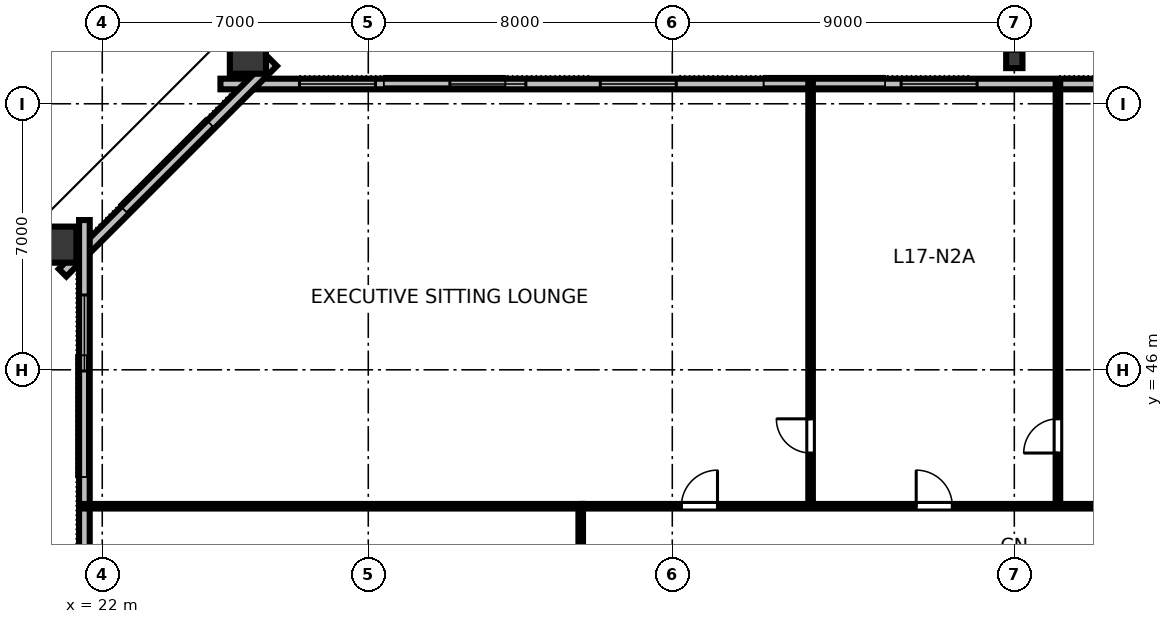
"""IFC4 building model, lengths in metres.
Left out: names, types, materials, properties, quantities, classifications, styles, units other than length and angle.
Written with IfcOpenShell. Run it as: python <this file> out.ifc"""

import sys

from ifc_helpers import new_model, si_unit, direction, frame, frame_2d, origin, origin_2d, place, context, subcontext, project, spatial, rectangle, hollow_rectangle, i_section, extrude, element, fill, save


model = new_model("IFC4")
c1 = context("Model", 3, precision=1e-05, world=origin(), true_north=direction((0.0, 1.0)))
c2 = subcontext(c1, "Body", "Model", "MODEL_VIEW")
j1 = project(units=[si_unit("LENGTHUNIT", "METRE"), si_unit("PLANEANGLEUNIT", "RADIAN")], contexts=[c1])
p1 = place(None, origin())
s1 = spatial("IfcSite", under=j1, at=p1, CompositionType="ELEMENT")
p2 = place(p1, origin())
s2 = spatial("IfcBuilding", under=s1, at=p2, CompositionType="ELEMENT")
p3 = place(p2, frame((0.0, 0.0, 67.6)))
s3 = spatial("IfcBuildingStorey", under=s2, at=p3, CompositionType="ELEMENT", Elevation=67.6)
p4 = place(p3, frame((46.0, 54.18, 0.0), z_axis=(0.0, 0.089001216718, 0.996031517284), x_axis=(-1.0, 0.0, 0.0)))
e1 = element("IfcColumn", 1, at=p4, inside=s3, PredefinedType="COLUMN", context=c2, shape_type="SweptSolid", body=[
    extrude(i_section(OverallWidth=0.428, OverallDepth=0.483, WebThickness=0.051, FlangeThickness=0.082, FilletRadius=0.025, at=origin_2d()), origin(), (0.0, 0.0, 1.0), 3.371),
])
p5 = place(p3, frame((25.832, 54.365, 0.0), z_axis=(-0.044927645815, 0.088480693771, 0.995064155455), x_axis=(-0.891639602851, -0.452745865389, 0.0)))
e2 = element("IfcColumn", 2, at=p5, inside=s3, PredefinedType="COLUMN", context=c2, shape_type="SweptSolid", body=[
    extrude(hollow_rectangle(XDim=0.95, YDim=1.15, WallThickness=0.06, at=origin_2d()), origin(), (0.0, 0.0, 1.0), 3.375),
])
p6 = place(p3, frame((20.744, 49.293, 0.0), z_axis=(-0.103221863164, 0.030287087301, 0.994197133021), x_axis=(0.953979075254, -0.279914028383, 0.107573512968)))
e3 = element("IfcColumn", 3, at=p6, inside=s3, PredefinedType="COLUMN", context=c2, shape_type="SweptSolid", body=[
    extrude(hollow_rectangle(XDim=0.95, YDim=1.15, WallThickness=0.06, at=origin_2d()), origin(), (0.0, 0.0, 1.0), 3.377),
])
p7 = place(p3, frame((66.89, 53.52, 0.0), z_axis=(0.0, 0.0, 1.0), x_axis=(-1.0, 0.0, 0.0)))
e4 = element("IfcWall", 4, at=p7, inside=s3, PredefinedType="STANDARD", context=c2, shape_type="SweptSolid", body=[
    extrude(rectangle(XDim=41.78, YDim=0.28, at=frame_2d((20.89, 0.0))), origin(), (0.0, 0.0, 1.0), 3.36),
])
p8 = place(p7, frame((2.079, 0.0, 0.8)))
e5 = element("IfcOpeningElement", 5, at=p8, cuts=e4, PredefinedType="OPENING", context=c2, shape_type="SweptSolid", body=[
    extrude(rectangle(XDim=2.0, YDim=1.95, at=frame_2d((1.0, 0.975))), frame((0.0, 0.15, 0.0), z_axis=(0.0, -1.0, 0.0), x_axis=(1.0, 0.0, 0.0)), (0.0, 0.0, 1.0), 0.3),
])
p9 = place(p7, frame((6.037, 0.0, 0.8)))
e6 = element("IfcOpeningElement", 6, at=p9, cuts=e4, PredefinedType="OPENING", context=c2, shape_type="SweptSolid", body=[
    extrude(rectangle(XDim=2.0, YDim=1.95, at=frame_2d((1.0, 0.975))), frame((0.0, 0.15, 0.0), z_axis=(0.0, -1.0, 0.0), x_axis=(1.0, 0.0, 0.0)), (0.0, 0.0, 1.0), 0.3),
])
p10 = place(p7, frame((9.995, 0.0, 0.8)))
e7 = element("IfcOpeningElement", 7, at=p10, cuts=e4, PredefinedType="OPENING", context=c2, shape_type="SweptSolid", body=[
    extrude(rectangle(XDim=2.0, YDim=1.95, at=frame_2d((1.0, 0.975))), frame((0.0, 0.15, 0.0), z_axis=(0.0, -1.0, 0.0), x_axis=(1.0, 0.0, 0.0)), (0.0, 0.0, 1.0), 0.3),
])
p11 = place(p7, frame((21.869, 0.0, 0.8)))
e8 = element("IfcOpeningElement", 8, at=p11, cuts=e4, PredefinedType="OPENING", context=c2, shape_type="SweptSolid", body=[
    extrude(rectangle(XDim=2.0, YDim=1.95, at=frame_2d((1.0, 0.975))), frame((0.0, 0.15, 0.0), z_axis=(0.0, -1.0, 0.0), x_axis=(1.0, 0.0, 0.0)), (0.0, 0.0, 1.0), 0.3),
])
p12 = place(p7, frame((29.785, 0.0, 0.8)))
e9 = element("IfcOpeningElement", 9, at=p12, cuts=e4, PredefinedType="OPENING", context=c2, shape_type="SweptSolid", body=[
    extrude(rectangle(XDim=2.0, YDim=1.95, at=frame_2d((1.0, 0.975))), frame((0.0, 0.15, 0.0), z_axis=(0.0, -1.0, 0.0), x_axis=(1.0, 0.0, 0.0)), (0.0, 0.0, 1.0), 0.3),
])
p13 = place(p7, frame((33.743, 0.0, 0.8)))
e10 = element("IfcOpeningElement", 10, at=p13, cuts=e4, PredefinedType="OPENING", context=c2, shape_type="SweptSolid", body=[
    extrude(rectangle(XDim=2.0, YDim=1.95, at=frame_2d((1.0, 0.975))), frame((0.0, 0.15, 0.0), z_axis=(0.0, -1.0, 0.0), x_axis=(1.0, 0.0, 0.0)), (0.0, 0.0, 1.0), 0.3),
])
p14 = place(p7, frame((37.701, 0.0, 0.8)))
e11 = element("IfcOpeningElement", 11, at=p14, cuts=e4, PredefinedType="OPENING", context=c2, shape_type="SweptSolid", body=[
    extrude(rectangle(XDim=2.0, YDim=1.95, at=frame_2d((1.0, 0.975))), frame((0.0, 0.15, 0.0), z_axis=(0.0, -1.0, 0.0), x_axis=(1.0, 0.0, 0.0)), (0.0, 0.0, 1.0), 0.3),
])
p15 = place(p3, frame((26.496, 54.094, 0.0), z_axis=(0.0, 0.0, 1.0), x_axis=(-0.707106781187, -0.707106781187, 0.0)))
e12 = element("IfcWall", 12, at=p15, inside=s3, PredefinedType="STANDARD", context=c2, shape_type="SweptSolid", body=[
    extrude(rectangle(XDim=7.834, YDim=0.28, at=frame_2d((3.917, 0.0))), origin(), (0.0, 0.0, 1.0), 3.36),
])
p16 = place(p3, frame((21.53, 49.94, 0.0), z_axis=(0.0, 0.0, 1.0), x_axis=(0.0, -1.0, 0.0)))
e13 = element("IfcWall", 13, at=p16, inside=s3, PredefinedType="STANDARD", context=c2, shape_type="SweptSolid", body=[
    extrude(rectangle(XDim=35.88, YDim=0.28, at=frame_2d((17.94, 0.0))), origin(), (0.0, 0.0, 1.0), 3.36),
])
p17 = place(p16, frame((14.57, 0.0, 0.0)))
e14 = element("IfcOpeningElement", 14, at=p17, cuts=e13, PredefinedType="OPENING", context=c2, shape_type="SweptSolid", body=[
    extrude(rectangle(XDim=1.4, YDim=2.15, at=frame_2d((0.7, 1.075))), frame((0.0, 0.15, 0.0), z_axis=(0.0, -1.0, 0.0), x_axis=(1.0, 0.0, 0.0)), (0.0, 0.0, 1.0), 0.3),
])
p18 = place(p16, frame((1.971, 0.0, 0.8)))
e15 = element("IfcOpeningElement", 15, at=p18, cuts=e13, PredefinedType="OPENING", context=c2, shape_type="SweptSolid", body=[
    extrude(rectangle(XDim=2.0, YDim=1.95, at=frame_2d((1.0, 0.975))), frame((0.0, 0.15, 0.0), z_axis=(0.0, -1.0, 0.0), x_axis=(1.0, 0.0, 0.0)), (0.0, 0.0, 1.0), 0.3),
])
p19 = place(p16, frame((9.456, 0.0, 0.8)))
e16 = element("IfcOpeningElement", 16, at=p19, cuts=e13, PredefinedType="OPENING", context=c2, shape_type="SweptSolid", body=[
    extrude(rectangle(XDim=2.0, YDim=1.95, at=frame_2d((1.0, 0.975))), frame((0.0, 0.15, 0.0), z_axis=(0.0, -1.0, 0.0), x_axis=(1.0, 0.0, 0.0)), (0.0, 0.0, 1.0), 0.3),
])
p20 = place(p16, frame((20.682, 0.0, 0.8)))
e17 = element("IfcOpeningElement", 17, at=p20, cuts=e13, PredefinedType="OPENING", context=c2, shape_type="SweptSolid", body=[
    extrude(rectangle(XDim=2.0, YDim=1.95, at=frame_2d((1.0, 0.975))), frame((0.0, 0.15, 0.0), z_axis=(0.0, -1.0, 0.0), x_axis=(1.0, 0.0, 0.0)), (0.0, 0.0, 1.0), 0.3),
])
p21 = place(p16, frame((24.424, 0.0, 0.8)))
e18 = element("IfcOpeningElement", 18, at=p21, cuts=e13, PredefinedType="OPENING", context=c2, shape_type="SweptSolid", body=[
    extrude(rectangle(XDim=2.0, YDim=1.95, at=frame_2d((1.0, 0.975))), frame((0.0, 0.15, 0.0), z_axis=(0.0, -1.0, 0.0), x_axis=(1.0, 0.0, 0.0)), (0.0, 0.0, 1.0), 0.3),
])
p22 = place(p16, frame((31.909, 0.0, 0.8)))
e19 = element("IfcOpeningElement", 19, at=p22, cuts=e13, PredefinedType="OPENING", context=c2, shape_type="SweptSolid", body=[
    extrude(rectangle(XDim=2.0, YDim=1.95, at=frame_2d((1.0, 0.975))), frame((0.0, 0.15, 0.0), z_axis=(0.0, -1.0, 0.0), x_axis=(1.0, 0.0, 0.0)), (0.0, 0.0, 1.0), 0.3),
])
p23 = place(p3, frame((40.639, 42.41, 0.0), z_axis=(0.0, 0.0, 1.0), x_axis=(0.0, 1.0, 0.0)))
e20 = element("IfcWall", 20, at=p23, inside=s3, PredefinedType="PARTITIONING", context=c2, shape_type="SweptSolid", body=[
    extrude(rectangle(XDim=11.11, YDim=0.12, at=frame_2d((5.555, 0.0))), origin(), (0.0, 0.0, 1.0), 2.64),
])
p24 = place(p23, frame((1.4, 0.0, 0.0)))
e21 = element("IfcOpeningElement", 21, at=p24, cuts=e20, PredefinedType="OPENING", context=c2, shape_type="SweptSolid", body=[
    extrude(rectangle(XDim=0.9, YDim=2.15, at=frame_2d((0.45, 1.075))), frame((0.0, 0.07, 0.0), z_axis=(0.0, -1.0, 0.0), x_axis=(1.0, 0.0, 0.0)), (0.0, 0.0, 1.0), 0.14),
])
p25 = place(p3, frame((47.148, 42.41, 0.0), z_axis=(0.0, 0.0, 1.0), x_axis=(0.0, 1.0, 0.0)))
e22 = element("IfcWall", 22, at=p25, inside=s3, PredefinedType="PARTITIONING", context=c2, shape_type="SweptSolid", body=[
    extrude(rectangle(XDim=11.11, YDim=0.12, at=frame_2d((5.555, 0.0))), origin(), (0.0, 0.0, 1.0), 2.64),
])
p26 = place(p25, frame((1.4, 0.0, 0.0)))
e23 = element("IfcOpeningElement", 23, at=p26, cuts=e22, PredefinedType="OPENING", context=c2, shape_type="SweptSolid", body=[
    extrude(rectangle(XDim=0.9, YDim=2.15, at=frame_2d((0.45, 1.075))), frame((0.0, 0.07, 0.0), z_axis=(0.0, -1.0, 0.0), x_axis=(1.0, 0.0, 0.0)), (0.0, 0.0, 1.0), 0.14),
])
p27 = place(p3, frame((34.65, 42.41, 0.0), z_axis=(0.0, 0.0, 1.0), x_axis=(1.0, 0.0, 0.0)))
e24 = element("IfcWall", 24, at=p27, inside=s3, PredefinedType="PARTITIONING", context=c2, shape_type="SweptSolid", body=[
    extrude(rectangle(XDim=22.7, YDim=0.12, at=frame_2d((11.35, 0.0))), origin(), (0.0, 0.0, 1.0), 2.64),
])
p28 = place(p27, frame((2.59, 0.0, 0.0)))
e25 = element("IfcOpeningElement", 25, at=p28, cuts=e24, PredefinedType="OPENING", context=c2, shape_type="SweptSolid", body=[
    extrude(rectangle(XDim=0.95, YDim=2.15, at=frame_2d((0.475, 1.075))), frame((0.0, 0.07, 0.0), z_axis=(0.0, -1.0, 0.0), x_axis=(1.0, 0.0, 0.0)), (0.0, 0.0, 1.0), 0.14),
])
p29 = place(p27, frame((8.768, 0.0, 0.0)))
e26 = element("IfcOpeningElement", 26, at=p29, cuts=e24, PredefinedType="OPENING", context=c2, shape_type="SweptSolid", body=[
    extrude(rectangle(XDim=0.95, YDim=2.15, at=frame_2d((0.475, 1.075))), frame((0.0, 0.07, 0.0), z_axis=(0.0, -1.0, 0.0), x_axis=(1.0, 0.0, 0.0)), (0.0, 0.0, 1.0), 0.14),
])
p30 = place(p27, frame((14.079, 0.0, 0.0)))
e27 = element("IfcOpeningElement", 27, at=p30, cuts=e24, PredefinedType="OPENING", context=c2, shape_type="SweptSolid", body=[
    extrude(rectangle(XDim=0.95, YDim=2.15, at=frame_2d((0.475, 1.075))), frame((0.0, 0.07, 0.0), z_axis=(0.0, -1.0, 0.0), x_axis=(1.0, 0.0, 0.0)), (0.0, 0.0, 1.0), 0.14),
])
p31 = place(p27, frame((19.11, 0.0, 0.0)))
e28 = element("IfcOpeningElement", 28, at=p31, cuts=e24, PredefinedType="OPENING", context=c2, shape_type="SweptSolid", body=[
    extrude(rectangle(XDim=0.95, YDim=2.15, at=frame_2d((0.475, 1.075))), frame((0.0, 0.07, 0.0), z_axis=(0.0, -1.0, 0.0), x_axis=(1.0, 0.0, 0.0)), (0.0, 0.0, 1.0), 0.14),
])
p32 = place(p3, frame((34.59, 21.65, 0.0), z_axis=(0.0, 0.0, 1.0), x_axis=(0.0, 1.0, 0.0)))
e29 = element("IfcWall", 29, at=p32, inside=s3, PredefinedType="PARTITIONING", context=c2, shape_type="SweptSolid", body=[
    extrude(rectangle(XDim=20.7, YDim=0.12, at=frame_2d((10.35, 0.0))), origin(), (0.0, 0.0, 1.0), 2.64),
])
p33 = place(p32, frame((6.696, 0.0, 0.0)))
e30 = element("IfcOpeningElement", 30, at=p33, cuts=e29, PredefinedType="OPENING", context=c2, shape_type="SweptSolid", body=[
    extrude(rectangle(XDim=0.95, YDim=2.15, at=frame_2d((0.475, 1.075))), frame((0.0, 0.07, 0.0), z_axis=(0.0, -1.0, 0.0), x_axis=(1.0, 0.0, 0.0)), (0.0, 0.0, 1.0), 0.14),
])
p34 = place(p32, frame((16.846, 0.0, 0.0)))
e31 = element("IfcOpeningElement", 31, at=p34, cuts=e29, PredefinedType="OPENING", context=c2, shape_type="SweptSolid", body=[
    extrude(rectangle(XDim=0.95, YDim=2.15, at=frame_2d((0.475, 1.075))), frame((0.0, 0.07, 0.0), z_axis=(0.0, -1.0, 0.0), x_axis=(1.0, 0.0, 0.0)), (0.0, 0.0, 1.0), 0.14),
])
p35 = place(p3, frame((34.65, 42.41, 0.0), z_axis=(0.0, 0.0, 1.0), x_axis=(-1.0, 0.0, 0.0)))
e32 = element("IfcWall", 32, at=p35, inside=s3, PredefinedType="PARTITIONING", context=c2, shape_type="SweptSolid", body=[
    extrude(rectangle(XDim=13.12, YDim=0.12, at=frame_2d((6.56, 0.0))), origin(), (0.0, 0.0, 1.0), 2.64),
])
p36 = place(p11, origin())
e33 = element("IfcWindow", 33, at=p36, inside=s3, PartitioningType="SINGLE_PANEL", PredefinedType="WINDOW", context=c2, shape_type="SweptSolid", body=[
    extrude(rectangle(XDim=2.0, YDim=1.95, at=frame_2d((1.0, 0.975))), frame((0.0, 0.03, 0.0), z_axis=(0.0, -1.0, 0.0), x_axis=(1.0, 0.0, 0.0)), (0.0, 0.0, 1.0), 0.06),
])
fill(e8, e33)
p37 = place(p12, origin())
e34 = element("IfcWindow", 34, at=p37, inside=s3, PartitioningType="SINGLE_PANEL", PredefinedType="WINDOW", context=c2, shape_type="SweptSolid", body=[
    extrude(rectangle(XDim=2.0, YDim=1.95, at=frame_2d((1.0, 0.975))), frame((0.0, 0.03, 0.0), z_axis=(0.0, -1.0, 0.0), x_axis=(1.0, 0.0, 0.0)), (0.0, 0.0, 1.0), 0.06),
])
fill(e9, e34)
p38 = place(p13, origin())
e35 = element("IfcWindow", 35, at=p38, inside=s3, PartitioningType="SINGLE_PANEL", PredefinedType="WINDOW", context=c2, shape_type="SweptSolid", body=[
    extrude(rectangle(XDim=2.0, YDim=1.95, at=frame_2d((1.0, 0.975))), frame((0.0, 0.03, 0.0), z_axis=(0.0, -1.0, 0.0), x_axis=(1.0, 0.0, 0.0)), (0.0, 0.0, 1.0), 0.06),
])
fill(e10, e35)
p39 = place(p14, origin())
e36 = element("IfcWindow", 36, at=p39, inside=s3, PartitioningType="SINGLE_PANEL", PredefinedType="WINDOW", context=c2, shape_type="SweptSolid", body=[
    extrude(rectangle(XDim=2.0, YDim=1.95, at=frame_2d((1.0, 0.975))), frame((0.0, 0.03, 0.0), z_axis=(0.0, -1.0, 0.0), x_axis=(1.0, 0.0, 0.0)), (0.0, 0.0, 1.0), 0.06),
])
fill(e11, e36)
p40 = place(p18, origin())
e37 = element("IfcWindow", 37, at=p40, inside=s3, PartitioningType="SINGLE_PANEL", PredefinedType="WINDOW", context=c2, shape_type="SweptSolid", body=[
    extrude(rectangle(XDim=2.0, YDim=1.95, at=frame_2d((1.0, 0.975))), frame((0.0, 0.03, 0.0), z_axis=(0.0, -1.0, 0.0), x_axis=(1.0, 0.0, 0.0)), (0.0, 0.0, 1.0), 0.06),
])
fill(e15, e37)
p41 = place(p24, origin())
e38 = element("IfcDoor", 38, at=p41, inside=s3, OperationType="SINGLE_SWING_RIGHT", PredefinedType="DOOR", context=c2, shape_type="SweptSolid", body=[
    extrude(rectangle(XDim=0.9, YDim=2.15, at=frame_2d((0.45, 1.075))), frame((0.0, 0.025, 0.0), z_axis=(0.0, -1.0, 0.0), x_axis=(1.0, 0.0, 0.0)), (0.0, 0.0, 1.0), 0.05),
])
fill(e21, e38)
p42 = place(p26, origin())
e39 = element("IfcDoor", 39, at=p42, inside=s3, OperationType="SINGLE_SWING_LEFT", PredefinedType="DOOR", context=c2, shape_type="SweptSolid", body=[
    extrude(rectangle(XDim=0.9, YDim=2.15, at=frame_2d((0.45, 1.075))), frame((0.0, 0.025, 0.0), z_axis=(0.0, -1.0, 0.0), x_axis=(1.0, 0.0, 0.0)), (0.0, 0.0, 1.0), 0.05),
])
fill(e23, e39)
p43 = place(p28, origin())
e40 = element("IfcDoor", 40, at=p43, inside=s3, OperationType="SINGLE_SWING_RIGHT", PredefinedType="DOOR", context=c2, shape_type="SweptSolid", body=[
    extrude(rectangle(XDim=0.95, YDim=2.15, at=frame_2d((0.475, 1.075))), frame((0.0, 0.025, 0.0), z_axis=(0.0, -1.0, 0.0), x_axis=(1.0, 0.0, 0.0)), (0.0, 0.0, 1.0), 0.05),
])
fill(e25, e40)
p44 = place(p29, origin())
e41 = element("IfcDoor", 41, at=p44, inside=s3, OperationType="SINGLE_SWING_LEFT", PredefinedType="DOOR", context=c2, shape_type="SweptSolid", body=[
    extrude(rectangle(XDim=0.95, YDim=2.15, at=frame_2d((0.475, 1.075))), frame((0.0, 0.025, 0.0), z_axis=(0.0, -1.0, 0.0), x_axis=(1.0, 0.0, 0.0)), (0.0, 0.0, 1.0), 0.05),
])
fill(e26, e41)
save(model, sys.argv[1])
